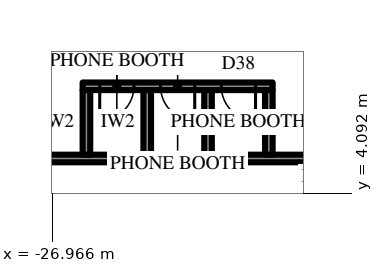
"""IFC4 building model, lengths in metres.
Left out: names, types, materials, properties, quantities, classifications, styles, units other than length and angle.
Written with IfcOpenShell. Run it as: python <this file> out.ifc"""

import sys

from ifc_helpers import new_model, si_unit, direction, frame, frame_2d, origin, place, context, subcontext, project, spatial, rectangle, extrude, element, fill, save


model = new_model("IFC4")
c1 = context("Model", 3, precision=1e-05, world=origin(), true_north=direction((0.0, 1.0)))
c2 = subcontext(c1, "Body", "Model", "MODEL_VIEW")
j1 = project(units=[si_unit("LENGTHUNIT", "METRE"), si_unit("PLANEANGLEUNIT", "RADIAN")], contexts=[c1])
p1 = place(None, origin())
s1 = spatial("IfcSite", under=j1, at=p1, CompositionType="ELEMENT")
p2 = place(p1, origin())
s2 = spatial("IfcBuilding", under=s1, at=p2, CompositionType="ELEMENT")
p3 = place(p2, frame((0.0, 0.0, 278.5)))
s3 = spatial("IfcBuildingStorey", under=s2, at=p3, CompositionType="ELEMENT", Elevation=278.5)
p4 = place(p3, frame((-15.5, 5.0, 0.0), z_axis=(0.0, 0.0, 1.0), x_axis=(-1.0, 0.0, 0.0)))
e1 = element("IfcWall", 1, at=p4, inside=s3, PredefinedType="PARTITIONING", context=c2, shape_type="SweptSolid", body=[
    extrude(rectangle(XDim=14.845, YDim=0.2, at=frame_2d((7.423, 0.0))), origin(), (0.0, 0.0, 1.0), 4.0),
])
p5 = place(p4, frame((0.985, 0.0, 0.0)))
e2 = element("IfcOpeningElement", 2, at=p5, cuts=e1, PredefinedType="OPENING", context=c2, shape_type="SweptSolid", body=[
    extrude(rectangle(XDim=1.0, YDim=2.2, at=frame_2d((0.5, 1.1))), frame((0.0, 0.11, 0.0), z_axis=(0.0, -1.0, 0.0), x_axis=(1.0, 0.0, 0.0)), (0.0, 0.0, 1.0), 0.22),
])
p6 = place(p3, frame((-21.165, 6.9, 0.0), z_axis=(0.0, 0.0, 1.0), x_axis=(-1.0, 0.0, 0.0)))
e3 = element("IfcWall", 3, at=p6, inside=s3, PredefinedType="PARTITIONING", context=c2, shape_type="SweptSolid", body=[
    extrude(rectangle(XDim=5.0, YDim=0.2, at=frame_2d((2.5, 0.0))), origin(), (0.0, 0.0, 1.0), 4.0),
])
p7 = place(p6, frame((0.45, 0.0, 0.0)))
e4 = element("IfcOpeningElement", 4, at=p7, cuts=e3, PredefinedType="OPENING", context=c2, shape_type="SweptSolid", body=[
    extrude(rectangle(XDim=0.9, YDim=2.2, at=frame_2d((0.45, 1.1))), frame((0.0, 0.11, 0.0), z_axis=(0.0, -1.0, 0.0), x_axis=(1.0, 0.0, 0.0)), (0.0, 0.0, 1.0), 0.22),
])
p8 = place(p6, frame((2.05, 0.0, 0.0)))
e5 = element("IfcOpeningElement", 5, at=p8, cuts=e3, PredefinedType="OPENING", context=c2, shape_type="SweptSolid", body=[
    extrude(rectangle(XDim=0.9, YDim=2.2, at=frame_2d((0.45, 1.1))), frame((0.0, 0.11, 0.0), z_axis=(0.0, -1.0, 0.0), x_axis=(1.0, 0.0, 0.0)), (0.0, 0.0, 1.0), 0.22),
])
p9 = place(p6, frame((3.65, 0.0, 0.0)))
e6 = element("IfcOpeningElement", 6, at=p9, cuts=e3, PredefinedType="OPENING", context=c2, shape_type="SweptSolid", body=[
    extrude(rectangle(XDim=0.9, YDim=2.2, at=frame_2d((0.45, 1.1))), frame((0.0, 0.11, 0.0), z_axis=(0.0, -1.0, 0.0), x_axis=(1.0, 0.0, 0.0)), (0.0, 0.0, 1.0), 0.22),
])
for number, where, z_axis, x_axis in (
    (7, (-21.265, 5.1, 0.0), (0.0, 0.0, 1.0), (0.0, 1.0, 0.0)),
    (8, (-22.865, 5.1, 0.0), (0.0, 0.0, 1.0), (0.0, 1.0, 0.0)),
    (9, (-24.465, 5.1, 0.0), (0.0, 0.0, 1.0), (0.0, 1.0, 0.0)),
    (10, (-26.065, 5.1, 0.0), (0.0, 0.0, 1.0), (0.0, 1.0, 0.0)),
):
    element("IfcWall", number, at=place(p3, frame(where, z_axis=z_axis, x_axis=x_axis)), inside=s3, PredefinedType="PARTITIONING", context=c2, shape_type="SweptSolid", body=[
        extrude(rectangle(XDim=1.7, YDim=0.2, at=frame_2d((0.85, 0.0))), origin(), (0.0, 0.0, 1.0), 4.0),
    ])
p10 = place(p7, origin())
e11 = element("IfcDoor", 11, at=p10, inside=s3, OperationType="SINGLE_SWING_RIGHT", PredefinedType="DOOR", context=c2, shape_type="SweptSolid", body=[
    extrude(rectangle(XDim=0.9, YDim=2.2, at=frame_2d((0.45, 1.1))), frame((0.0, 0.025, 0.0), z_axis=(0.0, -1.0, 0.0), x_axis=(1.0, 0.0, 0.0)), (0.0, 0.0, 1.0), 0.05),
])
fill(e4, e11)
p11 = place(p8, origin())
e12 = element("IfcDoor", 12, at=p11, inside=s3, OperationType="SINGLE_SWING_RIGHT", PredefinedType="DOOR", context=c2, shape_type="SweptSolid", body=[
    extrude(rectangle(XDim=0.9, YDim=2.2, at=frame_2d((0.45, 1.1))), frame((0.0, 0.025, 0.0), z_axis=(0.0, -1.0, 0.0), x_axis=(1.0, 0.0, 0.0)), (0.0, 0.0, 1.0), 0.05),
])
fill(e5, e12)
p12 = place(p9, origin())
e13 = element("IfcDoor", 13, at=p12, inside=s3, OperationType="SINGLE_SWING_LEFT", PredefinedType="DOOR", context=c2, shape_type="SweptSolid", body=[
    extrude(rectangle(XDim=0.9, YDim=2.2, at=frame_2d((0.45, 1.1))), frame((0.0, 0.025, 0.0), z_axis=(0.0, -1.0, 0.0), x_axis=(1.0, 0.0, 0.0)), (0.0, 0.0, 1.0), 0.05),
])
fill(e6, e13)
save(model, sys.argv[1])
